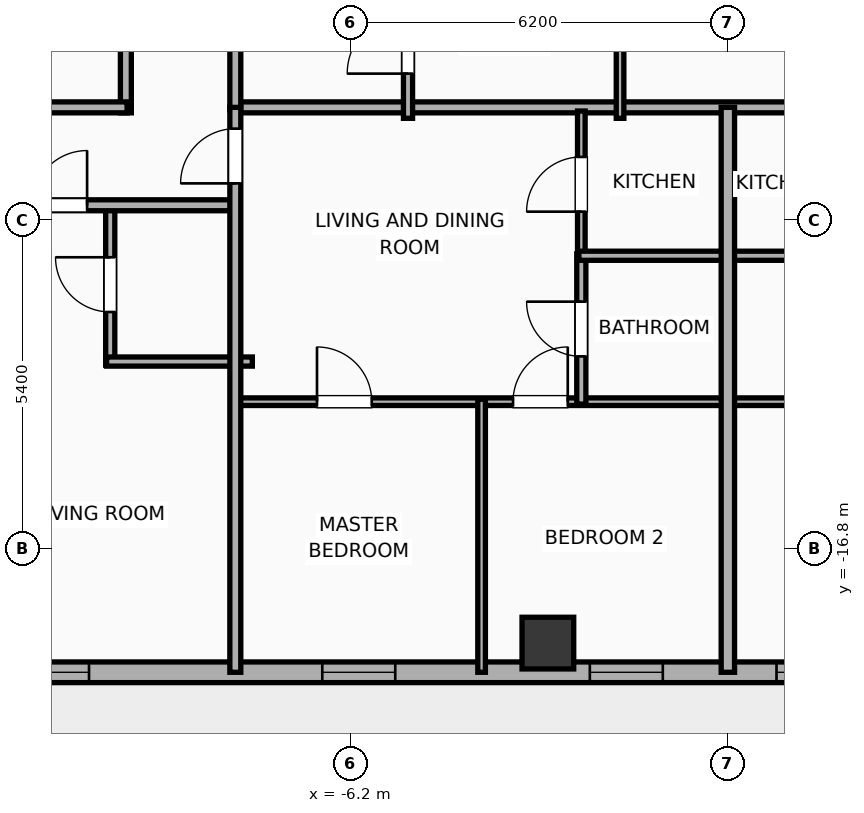
"""IFC4 building model, lengths in metres.
Left out: names, types, materials, properties, quantities, classifications, styles, units other than length and angle.
Written with IfcOpenShell. Run it as: python <this file> out.ifc"""

import sys

from ifc_helpers import new_model, si_unit, direction, frame, frame_2d, origin, origin_2d, place, context, subcontext, project, spatial, rectangle, hollow_rectangle, extrude, element, fill, save


model = new_model("IFC4")
c1 = context("Model", 3, precision=1e-05, world=origin(), true_north=direction((0.0, 1.0)))
c2 = subcontext(c1, "Body", "Model", "MODEL_VIEW")
j1 = project(units=[si_unit("LENGTHUNIT", "METRE"), si_unit("PLANEANGLEUNIT", "RADIAN")], contexts=[c1])
p1 = place(None, origin())
s1 = spatial("IfcSite", under=j1, at=p1, CompositionType="ELEMENT")
p2 = place(p1, origin())
s2 = spatial("IfcBuilding", under=s1, at=p2, CompositionType="ELEMENT")
p3 = place(p2, frame((0.0, 0.0, 231.4)))
s3 = spatial("IfcBuildingStorey", under=s2, at=p3, CompositionType="ELEMENT", Elevation=231.4)
p4 = place(p3, frame((-2.96, -18.35, 0.0), z_axis=(0.0, 0.0, 1.0), x_axis=(1.0, 0.0, 0.0)))
e1 = element("IfcColumn", 1, at=p4, inside=s3, PredefinedType="COLUMN", context=c2, shape_type="SweptSolid", body=[
    extrude(hollow_rectangle(XDim=0.85, YDim=0.85, WallThickness=0.028, at=origin_2d()), origin(), (0.0, 0.0, 1.0), 3.9),
])
p5 = place(p3, frame((26.783, -18.83, 0.0), z_axis=(0.0, 0.0, 1.0), x_axis=(-1.0, 0.0, 0.0)))
e2 = element("IfcWall", 2, at=p5, inside=s3, PredefinedType="ELEMENTEDWALL", context=c2, shape_type="SweptSolid", body=[
    extrude(rectangle(XDim=49.566, YDim=0.34, at=frame_2d((24.783, 0.0))), origin(), (0.0, 0.0, 1.0), 3.65),
])
p6 = place(p5, frame((23.583, 0.0, 0.75)))
e3 = element("IfcOpeningElement", 3, at=p6, cuts=e2, PredefinedType="OPENING", context=c2, shape_type="SweptSolid", body=[
    extrude(rectangle(XDim=2.4, YDim=2.1, at=frame_2d((1.2, 1.05))), frame((0.0, 0.18, 0.0), z_axis=(0.0, -1.0, 0.0), x_axis=(1.0, 0.0, 0.0)), (0.0, 0.0, 1.0), 0.36),
])
p7 = place(p5, frame((41.756, 0.0, 0.75)))
e4 = element("IfcOpeningElement", 4, at=p7, cuts=e2, PredefinedType="OPENING", context=c2, shape_type="SweptSolid", body=[
    extrude(rectangle(XDim=2.4, YDim=2.1, at=frame_2d((1.2, 1.05))), frame((0.0, 0.18, 0.0), z_axis=(0.0, -1.0, 0.0), x_axis=(1.0, 0.0, 0.0)), (0.0, 0.0, 1.0), 0.36),
])
p8 = place(p5, frame((47.222, 0.0, 0.75)))
e5 = element("IfcOpeningElement", 5, at=p8, cuts=e2, PredefinedType="OPENING", context=c2, shape_type="SweptSolid", body=[
    extrude(rectangle(XDim=1.2, YDim=2.05, at=frame_2d((0.6, 1.025))), frame((0.0, 0.18, 0.0), z_axis=(0.0, -1.0, 0.0), x_axis=(1.0, 0.0, 0.0)), (0.0, 0.0, 1.0), 0.36),
])
p9 = place(p5, frame((45.263, 0.0, 0.75)))
e6 = element("IfcOpeningElement", 6, at=p9, cuts=e2, PredefinedType="OPENING", context=c2, shape_type="SweptSolid", body=[
    extrude(rectangle(XDim=1.2, YDim=2.05, at=frame_2d((0.6, 1.025))), frame((0.0, 0.18, 0.0), z_axis=(0.0, -1.0, 0.0), x_axis=(1.0, 0.0, 0.0)), (0.0, 0.0, 1.0), 0.36),
])
p10 = place(p5, frame((37.289, 0.0, 0.75)))
e7 = element("IfcOpeningElement", 7, at=p10, cuts=e2, PredefinedType="OPENING", context=c2, shape_type="SweptSolid", body=[
    extrude(rectangle(XDim=1.2, YDim=2.05, at=frame_2d((0.6, 1.025))), frame((0.0, 0.18, 0.0), z_axis=(0.0, -1.0, 0.0), x_axis=(1.0, 0.0, 0.0)), (0.0, 0.0, 1.0), 0.36),
])
p11 = place(p5, frame((16.115, 0.0, 0.75)))
e8 = element("IfcOpeningElement", 8, at=p11, cuts=e2, PredefinedType="OPENING", context=c2, shape_type="SweptSolid", body=[
    extrude(rectangle(XDim=1.2, YDim=2.05, at=frame_2d((0.6, 1.025))), frame((0.0, 0.18, 0.0), z_axis=(0.0, -1.0, 0.0), x_axis=(1.0, 0.0, 0.0)), (0.0, 0.0, 1.0), 0.36),
])
p12 = place(p5, frame((12.422, 0.0, 0.75)))
e9 = element("IfcOpeningElement", 9, at=p12, cuts=e2, PredefinedType="OPENING", context=c2, shape_type="SweptSolid", body=[
    extrude(rectangle(XDim=1.2, YDim=2.05, at=frame_2d((0.6, 1.025))), frame((0.0, 0.18, 0.0), z_axis=(0.0, -1.0, 0.0), x_axis=(1.0, 0.0, 0.0)), (0.0, 0.0, 1.0), 0.36),
])
p13 = place(p5, frame((8.01, 0.0, 0.75)))
e10 = element("IfcOpeningElement", 10, at=p13, cuts=e2, PredefinedType="OPENING", context=c2, shape_type="SweptSolid", body=[
    extrude(rectangle(XDim=1.2, YDim=2.05, at=frame_2d((0.6, 1.025))), frame((0.0, 0.18, 0.0), z_axis=(0.0, -1.0, 0.0), x_axis=(1.0, 0.0, 0.0)), (0.0, 0.0, 1.0), 0.36),
])
p14 = place(p5, frame((5.037, 0.0, 0.75)))
e11 = element("IfcOpeningElement", 11, at=p14, cuts=e2, PredefinedType="OPENING", context=c2, shape_type="SweptSolid", body=[
    extrude(rectangle(XDim=1.2, YDim=2.05, at=frame_2d((0.6, 1.025))), frame((0.0, 0.18, 0.0), z_axis=(0.0, -1.0, 0.0), x_axis=(1.0, 0.0, 0.0)), (0.0, 0.0, 1.0), 0.36),
])
p15 = place(p5, frame((1.811, 0.0, 0.75)))
e12 = element("IfcOpeningElement", 12, at=p15, cuts=e2, PredefinedType="OPENING", context=c2, shape_type="SweptSolid", body=[
    extrude(rectangle(XDim=1.2, YDim=2.05, at=frame_2d((0.6, 1.025))), frame((0.0, 0.18, 0.0), z_axis=(0.0, -1.0, 0.0), x_axis=(1.0, 0.0, 0.0)), (0.0, 0.0, 1.0), 0.36),
])
p16 = place(p5, frame((32.253, 0.0, 0.75)))
e13 = element("IfcOpeningElement", 13, at=p16, cuts=e2, PredefinedType="OPENING", context=c2, shape_type="SweptSolid", body=[
    extrude(rectangle(XDim=1.2, YDim=2.05, at=frame_2d((0.6, 1.025))), frame((0.0, 0.18, 0.0), z_axis=(0.0, -1.0, 0.0), x_axis=(1.0, 0.0, 0.0)), (0.0, 0.0, 1.0), 0.36),
])
p17 = place(p5, frame((27.853, 0.0, 0.75)))
e14 = element("IfcOpeningElement", 14, at=p17, cuts=e2, PredefinedType="OPENING", context=c2, shape_type="SweptSolid", body=[
    extrude(rectangle(XDim=1.2, YDim=2.05, at=frame_2d((0.6, 1.025))), frame((0.0, 0.18, 0.0), z_axis=(0.0, -1.0, 0.0), x_axis=(1.0, 0.0, 0.0)), (0.0, 0.0, 1.0), 0.36),
])
p18 = place(p5, frame((20.473, 0.0, 0.75)))
e15 = element("IfcOpeningElement", 15, at=p18, cuts=e2, PredefinedType="OPENING", context=c2, shape_type="SweptSolid", body=[
    extrude(rectangle(XDim=1.2, YDim=2.05, at=frame_2d((0.6, 1.025))), frame((0.0, 0.18, 0.0), z_axis=(0.0, -1.0, 0.0), x_axis=(1.0, 0.0, 0.0)), (0.0, 0.0, 1.0), 0.36),
])
p19 = place(p3, frame((-9.9, -9.63, 0.0), z_axis=(0.0, 0.0, 1.0), x_axis=(0.0, 1.0, 0.0)))
e16 = element("IfcWall", 16, at=p19, inside=s3, PredefinedType="PARTITIONING", context=c2, shape_type="SweptSolid", body=[
    extrude(rectangle(XDim=19.26, YDim=0.18, at=frame_2d((9.63, 0.0))), origin(), (0.0, 0.0, 1.0), 3.65),
])
p20 = place(p19, frame((8.117, 0.0, 0.0)))
e17 = element("IfcOpeningElement", 17, at=p20, cuts=e16, PredefinedType="OPENING", context=c2, shape_type="SweptSolid", body=[
    extrude(rectangle(XDim=1.1, YDim=2.05, at=frame_2d((0.55, 1.025))), frame((0.0, 0.1, 0.0), z_axis=(0.0, -1.0, 0.0), x_axis=(1.0, 0.0, 0.0)), (0.0, 0.0, 1.0), 0.2),
])
p21 = place(p3, frame((-26.23, -9.54, 0.0), z_axis=(0.0, 0.0, 1.0), x_axis=(1.0, 0.0, 0.0)))
e18 = element("IfcWall", 18, at=p21, inside=s3, PredefinedType="PARTITIONING", context=c2, shape_type="SweptSolid", body=[
    extrude(rectangle(XDim=16.35, YDim=0.18, at=frame_2d((8.175, 0.0))), origin(), (0.0, 0.0, 1.0), 3.65),
])
p22 = place(p3, frame((-8.15, -9.54, 0.0), z_axis=(0.0, 0.0, 1.0), x_axis=(1.0, 0.0, 0.0)))
e19 = element("IfcWall", 19, at=p22, inside=s3, PredefinedType="PARTITIONING", context=c2, shape_type="SweptSolid", body=[
    extrude(rectangle(XDim=16.3, YDim=0.18, at=frame_2d((8.15, 0.0))), origin(), (0.0, 0.0, 1.0), 3.65),
])
p23 = place(p3, frame((-8.1, -9.58, 0.0), z_axis=(0.0, 0.0, 1.0), x_axis=(0.0, 1.0, 0.0)))
e20 = element("IfcWall", 20, at=p23, inside=s3, PredefinedType="PARTITIONING", context=c2, shape_type="SweptSolid", body=[
    extrude(rectangle(XDim=19.16, YDim=0.18, at=frame_2d((9.58, 0.0))), origin(), (0.0, 0.0, 1.0), 3.65),
])
p24 = place(p23, frame((1.416, 0.0, 0.0)))
e21 = element("IfcOpeningElement", 21, at=p24, cuts=e20, PredefinedType="OPENING", context=c2, shape_type="SweptSolid", body=[
    extrude(rectangle(XDim=1.0, YDim=2.05, at=frame_2d((0.5, 1.025))), frame((0.0, 0.1, 0.0), z_axis=(0.0, -1.0, 0.0), x_axis=(1.0, 0.0, 0.0)), (0.0, 0.0, 1.0), 0.2),
])
p25 = place(p23, frame((11.021, 0.0, 0.0)))
e22 = element("IfcOpeningElement", 22, at=p25, cuts=e20, PredefinedType="OPENING", context=c2, shape_type="SweptSolid", body=[
    extrude(rectangle(XDim=0.95, YDim=2.05, at=frame_2d((0.475, 1.025))), frame((0.0, 0.1, 0.0), z_axis=(0.0, -1.0, 0.0), x_axis=(1.0, 0.0, 0.0)), (0.0, 0.0, 1.0), 0.2),
])
p26 = place(p3, frame((-5.26, -9.72, 0.0), z_axis=(0.0, 0.0, 1.0), x_axis=(0.0, 1.0, 0.0)))
e23 = element("IfcWall", 23, at=p26, inside=s3, PredefinedType="PLUMBINGWALL", context=c2, shape_type="SweptSolid", body=[
    extrude(rectangle(XDim=3.35, YDim=0.15, at=frame_2d((1.675, 0.0))), origin(), (0.0, 0.0, 1.0), 3.65),
])
p27 = place(p26, frame((0.735, 0.0, 0.0)))
e24 = element("IfcOpeningElement", 24, at=p27, cuts=e23, PredefinedType="OPENING", context=c2, shape_type="SweptSolid", body=[
    extrude(rectangle(XDim=1.0, YDim=2.05, at=frame_2d((0.5, 1.025))), frame((0.0, 0.085, 0.0), z_axis=(0.0, -1.0, 0.0), x_axis=(1.0, 0.0, 0.0)), (0.0, 0.0, 1.0), 0.17),
])
p28 = place(p3, frame((-1.773, -9.72, 0.0), z_axis=(0.0, 0.0, 1.0), x_axis=(0.0, 1.0, 0.0)))
e25 = element("IfcWall", 25, at=p28, inside=s3, PredefinedType="PARTITIONING", context=c2, shape_type="SweptSolid", body=[
    extrude(rectangle(XDim=19.39, YDim=0.125, at=frame_2d((9.695, 0.0))), origin(), (0.0, 0.0, 1.0), 3.65),
])
p29 = place(p28, frame((9.22, 0.0, 0.0)))
e26 = element("IfcOpeningElement", 26, at=p29, cuts=e25, PredefinedType="OPENING", context=c2, shape_type="SweptSolid", body=[
    extrude(rectangle(XDim=0.95, YDim=2.05, at=frame_2d((0.475, 1.025))), frame((0.0, 0.073, 0.0), z_axis=(0.0, -1.0, 0.0), x_axis=(1.0, 0.0, 0.0)), (0.0, 0.0, 1.0), 0.145),
])
p30 = place(p3, frame((-10.157, -13.78, 0.0), z_axis=(0.0, 0.0, 1.0), x_axis=(0.0, 1.0, 0.0)))
e27 = element("IfcWall", 27, at=p30, inside=s3, PredefinedType="PLUMBINGWALL", context=c2, shape_type="SweptSolid", body=[
    extrude(rectangle(XDim=2.65, YDim=0.15, at=frame_2d((1.325, 0.0))), origin(), (0.0, 0.0, 1.0), 3.65),
])
p31 = place(p30, frame((0.875, 0.0, 0.0)))
e28 = element("IfcOpeningElement", 28, at=p31, cuts=e27, PredefinedType="OPENING", context=c2, shape_type="SweptSolid", body=[
    extrude(rectangle(XDim=0.9, YDim=2.05, at=frame_2d((0.45, 1.025))), frame((0.0, 0.085, 0.0), z_axis=(0.0, -1.0, 0.0), x_axis=(1.0, 0.0, 0.0)), (0.0, 0.0, 1.0), 0.17),
])
p32 = place(p3, frame((-10.217, -13.72, 0.0), z_axis=(0.0, 0.0, 1.0), x_axis=(1.0, 0.0, 0.0)))
e29 = element("IfcWall", 29, at=p32, inside=s3, PredefinedType="PLUMBINGWALL", context=c2, shape_type="SweptSolid", body=[
    extrude(rectangle(XDim=2.397, YDim=0.15, at=frame_2d((1.198, 0.0))), origin(), (0.0, 0.0, 1.0), 3.65),
])
p33 = place(p3, frame((-26.23, -11.15, 0.0), z_axis=(0.0, 0.0, 1.0), x_axis=(1.0, 0.0, 0.0)))
e30 = element("IfcWall", 30, at=p33, inside=s3, PredefinedType="PARTITIONING", context=c2, shape_type="SweptSolid", body=[
    extrude(rectangle(XDim=18.15, YDim=0.18, at=frame_2d((9.075, 0.0))), origin(), (0.0, 0.0, 1.0), 3.65),
])
p34 = place(p33, frame((2.659, 0.0, 0.0)))
e31 = element("IfcOpeningElement", 31, at=p34, cuts=e30, PredefinedType="OPENING", context=c2, shape_type="SweptSolid", body=[
    extrude(rectangle(XDim=0.9, YDim=2.05, at=frame_2d((0.45, 1.025))), frame((0.0, 0.1, 0.0), z_axis=(0.0, -1.0, 0.0), x_axis=(1.0, 0.0, 0.0)), (0.0, 0.0, 1.0), 0.2),
])
p35 = place(p33, frame((9.571, 0.0, 0.0)))
e32 = element("IfcOpeningElement", 32, at=p35, cuts=e30, PredefinedType="OPENING", context=c2, shape_type="SweptSolid", body=[
    extrude(rectangle(XDim=1.15, YDim=2.05, at=frame_2d((0.575, 1.025))), frame((0.0, 0.1, 0.0), z_axis=(0.0, -1.0, 0.0), x_axis=(1.0, 0.0, 0.0)), (0.0, 0.0, 1.0), 0.2),
])
p36 = place(p33, frame((14.792, 0.0, 0.0)))
e33 = element("IfcOpeningElement", 33, at=p36, cuts=e30, PredefinedType="OPENING", context=c2, shape_type="SweptSolid", body=[
    extrude(rectangle(XDim=0.9, YDim=2.05, at=frame_2d((0.45, 1.025))), frame((0.0, 0.1, 0.0), z_axis=(0.0, -1.0, 0.0), x_axis=(1.0, 0.0, 0.0)), (0.0, 0.0, 1.0), 0.2),
])
p37 = place(p3, frame((-8.08, -14.38, 0.0), z_axis=(0.0, 0.0, 1.0), x_axis=(1.0, 0.0, 0.0)))
e34 = element("IfcWall", 34, at=p37, inside=s3, PredefinedType="PARTITIONING", context=c2, shape_type="SweptSolid", body=[
    extrude(rectangle(XDim=8.06, YDim=0.125, at=frame_2d((4.03, 0.0))), origin(), (0.0, 0.0, 1.0), 3.65),
])
p38 = place(p37, frame((1.323, 0.0, 0.0)))
e35 = element("IfcOpeningElement", 35, at=p38, cuts=e34, PredefinedType="OPENING", context=c2, shape_type="SweptSolid", body=[
    extrude(rectangle(XDim=0.9, YDim=2.05, at=frame_2d((0.45, 1.025))), frame((0.0, 0.073, 0.0), z_axis=(0.0, -1.0, 0.0), x_axis=(1.0, 0.0, 0.0)), (0.0, 0.0, 1.0), 0.145),
])
p39 = place(p37, frame((4.547, 0.0, 0.0)))
e36 = element("IfcOpeningElement", 36, at=p39, cuts=e34, PredefinedType="OPENING", context=c2, shape_type="SweptSolid", body=[
    extrude(rectangle(XDim=0.9, YDim=2.05, at=frame_2d((0.45, 1.025))), frame((0.0, 0.073, 0.0), z_axis=(0.0, -1.0, 0.0), x_axis=(1.0, 0.0, 0.0)), (0.0, 0.0, 1.0), 0.145),
])
p40 = place(p3, frame((-2.41, -12.01, 0.0), z_axis=(0.0, 0.0, 1.0), x_axis=(0.0, 1.0, 0.0)))
e37 = element("IfcWall", 37, at=p40, inside=s3, PredefinedType="PARTITIONING", context=c2, shape_type="SweptSolid", body=[
    extrude(rectangle(XDim=2.41, YDim=0.125, at=frame_2d((1.205, 0.0))), origin(), (0.0, 0.0, 1.0), 3.65),
])
p41 = place(p40, frame((0.755, 0.0, 0.0)))
e38 = element("IfcOpeningElement", 38, at=p41, cuts=e37, PredefinedType="OPENING", context=c2, shape_type="SweptSolid", body=[
    extrude(rectangle(XDim=0.9, YDim=2.05, at=frame_2d((0.45, 1.025))), frame((0.0, 0.073, 0.0), z_axis=(0.0, -1.0, 0.0), x_axis=(1.0, 0.0, 0.0)), (0.0, 0.0, 1.0), 0.145),
])
p42 = place(p3, frame((-2.41, -14.42, 0.0), z_axis=(0.0, 0.0, 1.0), x_axis=(0.0, 1.0, 0.0)))
e39 = element("IfcWall", 39, at=p42, inside=s3, PredefinedType="PLUMBINGWALL", context=c2, shape_type="SweptSolid", body=[
    extrude(rectangle(XDim=2.47, YDim=0.15, at=frame_2d((1.235, 0.0))), origin(), (0.0, 0.0, 1.0), 3.65),
])
p43 = place(p42, frame((0.785, 0.0, 0.0)))
e40 = element("IfcOpeningElement", 40, at=p43, cuts=e39, PredefinedType="OPENING", context=c2, shape_type="SweptSolid", body=[
    extrude(rectangle(XDim=0.9, YDim=2.05, at=frame_2d((0.45, 1.025))), frame((0.0, 0.085, 0.0), z_axis=(0.0, -1.0, 0.0), x_axis=(1.0, 0.0, 0.0)), (0.0, 0.0, 1.0), 0.17),
])
p44 = place(p3, frame((-2.45, -11.98, 0.0), z_axis=(0.0, 0.0, 1.0), x_axis=(1.0, 0.0, 0.0)))
e41 = element("IfcWall", 41, at=p44, inside=s3, PredefinedType="PLUMBINGWALL", context=c2, shape_type="SweptSolid", body=[
    extrude(rectangle(XDim=2.43, YDim=0.15, at=frame_2d((1.215, 0.0))), origin(), (0.0, 0.0, 1.0), 3.65),
])
p45 = place(p3, frame((-4.05, -18.83, 0.0), z_axis=(0.0, 0.0, 1.0), x_axis=(0.0, 1.0, 0.0)))
e42 = element("IfcWall", 42, at=p45, inside=s3, PredefinedType="PARTITIONING", context=c2, shape_type="SweptSolid", body=[
    extrude(rectangle(XDim=4.49, YDim=0.125, at=frame_2d((2.245, 0.0))), origin(), (0.0, 0.0, 1.0), 3.65),
])
p46 = place(p3, frame((-8.1, -18.83, 0.0), z_axis=(0.0, 0.0, 1.0), x_axis=(0.0, 1.0, 0.0)))
e43 = element("IfcWall", 43, at=p46, inside=s3, PredefinedType="PARTITIONING", context=c2, shape_type="SweptSolid", body=[
    extrude(rectangle(XDim=9.29, YDim=0.18, at=frame_2d((4.645, 0.0))), origin(), (0.0, 0.0, 1.0), 3.65),
])
p47 = place(p46, frame((8.04, 0.0, 0.0)))
e44 = element("IfcOpeningElement", 44, at=p47, cuts=e43, PredefinedType="OPENING", context=c2, shape_type="SweptSolid", body=[
    extrude(rectangle(XDim=0.9, YDim=2.05, at=frame_2d((0.45, 1.025))), frame((0.0, 0.1, 0.0), z_axis=(0.0, -1.0, 0.0), x_axis=(1.0, 0.0, 0.0)), (0.0, 0.0, 1.0), 0.2),
])
p48 = place(p3, frame((0.02, -14.38, 0.0), z_axis=(0.0, 0.0, 1.0), x_axis=(1.0, 0.0, 0.0)))
e45 = element("IfcWall", 45, at=p48, inside=s3, PredefinedType="PARTITIONING", context=c2, shape_type="SweptSolid", body=[
    extrude(rectangle(XDim=8.06, YDim=0.125, at=frame_2d((4.03, 0.0))), origin(), (0.0, 0.0, 1.0), 3.65),
])
p49 = place(p48, frame((1.323, 0.0, 0.0)))
e46 = element("IfcOpeningElement", 46, at=p49, cuts=e45, PredefinedType="OPENING", context=c2, shape_type="SweptSolid", body=[
    extrude(rectangle(XDim=0.9, YDim=2.05, at=frame_2d((0.45, 1.025))), frame((0.0, 0.073, 0.0), z_axis=(0.0, -1.0, 0.0), x_axis=(1.0, 0.0, 0.0)), (0.0, 0.0, 1.0), 0.145),
])
p50 = place(p48, frame((5.837, 0.0, 0.0)))
e47 = element("IfcOpeningElement", 47, at=p50, cuts=e45, PredefinedType="OPENING", context=c2, shape_type="SweptSolid", body=[
    extrude(rectangle(XDim=0.9, YDim=2.05, at=frame_2d((0.45, 1.025))), frame((0.0, 0.073, 0.0), z_axis=(0.0, -1.0, 0.0), x_axis=(1.0, 0.0, 0.0)), (0.0, 0.0, 1.0), 0.145),
])
p51 = place(p3, frame((0.02, -11.98, 0.0), z_axis=(0.0, 0.0, 1.0), x_axis=(1.0, 0.0, 0.0)))
e48 = element("IfcWall", 48, at=p51, inside=s3, PredefinedType="PLUMBINGWALL", context=c2, shape_type="SweptSolid", body=[
    extrude(rectangle(XDim=2.43, YDim=0.15, at=frame_2d((1.215, 0.0))), origin(), (0.0, 0.0, 1.0), 3.65),
])
p52 = place(p3, frame((0.0, -18.83, 0.0), z_axis=(0.0, 0.0, 1.0), x_axis=(0.0, 1.0, 0.0)))
e49 = element("IfcWall", 49, at=p52, inside=s3, PredefinedType="PARTITIONING", context=c2, shape_type="SweptSolid", body=[
    extrude(rectangle(XDim=9.29, YDim=0.22, at=frame_2d((4.645, 0.0))), origin(), (0.0, 0.0, 1.0), 3.65),
])
p53 = place(p6, origin())
e50 = element("IfcWindow", 50, at=p53, inside=s3, PartitioningType="SINGLE_PANEL", PredefinedType="WINDOW", context=c2, shape_type="SweptSolid", body=[
    extrude(rectangle(XDim=2.4, YDim=2.1, at=frame_2d((1.2, 1.05))), frame((0.0, 0.03, 0.0), z_axis=(0.0, -1.0, 0.0), x_axis=(1.0, 0.0, 0.0)), (0.0, 0.0, 1.0), 0.06),
])
fill(e3, e50)
p54 = place(p10, origin())
e51 = element("IfcWindow", 51, at=p54, inside=s3, PartitioningType="SINGLE_PANEL", PredefinedType="WINDOW", context=c2, shape_type="SweptSolid", body=[
    extrude(rectangle(XDim=1.2, YDim=2.05, at=frame_2d((0.6, 1.025))), frame((0.0, 0.03, 0.0), z_axis=(0.0, -1.0, 0.0), x_axis=(1.0, 0.0, 0.0)), (0.0, 0.0, 1.0), 0.06),
])
fill(e7, e51)
p55 = place(p16, origin())
e52 = element("IfcWindow", 52, at=p55, inside=s3, PartitioningType="SINGLE_PANEL", PredefinedType="WINDOW", context=c2, shape_type="SweptSolid", body=[
    extrude(rectangle(XDim=1.2, YDim=2.05, at=frame_2d((0.6, 1.025))), frame((0.0, 0.03, 0.0), z_axis=(0.0, -1.0, 0.0), x_axis=(1.0, 0.0, 0.0)), (0.0, 0.0, 1.0), 0.06),
])
fill(e13, e52)
p56 = place(p17, origin())
e53 = element("IfcWindow", 53, at=p56, inside=s3, PartitioningType="SINGLE_PANEL", PredefinedType="WINDOW", context=c2, shape_type="SweptSolid", body=[
    extrude(rectangle(XDim=1.2, YDim=2.05, at=frame_2d((0.6, 1.025))), frame((0.0, 0.03, 0.0), z_axis=(0.0, -1.0, 0.0), x_axis=(1.0, 0.0, 0.0)), (0.0, 0.0, 1.0), 0.06),
])
fill(e14, e53)
p57 = place(p27, origin())
e54 = element("IfcDoor", 54, at=p57, inside=s3, OperationType="SINGLE_SWING_LEFT", PredefinedType="DOOR", context=c2, shape_type="SweptSolid", body=[
    extrude(rectangle(XDim=1.0, YDim=2.05, at=frame_2d((0.5, 1.025))), frame((0.0, 0.025, 0.0), z_axis=(0.0, -1.0, 0.0), x_axis=(1.0, 0.0, 0.0)), (0.0, 0.0, 1.0), 0.05),
])
fill(e24, e54)
p58 = place(p31, origin())
e55 = element("IfcDoor", 55, at=p58, inside=s3, OperationType="SINGLE_SWING_RIGHT", PredefinedType="DOOR", context=c2, shape_type="SweptSolid", body=[
    extrude(rectangle(XDim=0.9, YDim=2.05, at=frame_2d((0.45, 1.025))), frame((0.0, 0.025, 0.0), z_axis=(0.0, -1.0, 0.0), x_axis=(1.0, 0.0, 0.0)), (0.0, 0.0, 1.0), 0.05),
])
fill(e28, e55)
p59 = place(p36, origin())
e56 = element("IfcDoor", 56, at=p59, inside=s3, OperationType="SINGLE_SWING_RIGHT", PredefinedType="DOOR", context=c2, shape_type="SweptSolid", body=[
    extrude(rectangle(XDim=0.9, YDim=2.05, at=frame_2d((0.45, 1.025))), frame((0.0, 0.025, 0.0), z_axis=(0.0, -1.0, 0.0), x_axis=(1.0, 0.0, 0.0)), (0.0, 0.0, 1.0), 0.05),
])
fill(e33, e56)
p60 = place(p38, origin())
e57 = element("IfcDoor", 57, at=p60, inside=s3, OperationType="SINGLE_SWING_LEFT", PredefinedType="DOOR", context=c2, shape_type="SweptSolid", body=[
    extrude(rectangle(XDim=0.9, YDim=2.05, at=frame_2d((0.45, 1.025))), frame((0.0, 0.025, 0.0), z_axis=(0.0, -1.0, 0.0), x_axis=(1.0, 0.0, 0.0)), (0.0, 0.0, 1.0), 0.05),
])
fill(e35, e57)
p61 = place(p39, origin())
e58 = element("IfcDoor", 58, at=p61, inside=s3, OperationType="SINGLE_SWING_RIGHT", PredefinedType="DOOR", context=c2, shape_type="SweptSolid", body=[
    extrude(rectangle(XDim=0.9, YDim=2.05, at=frame_2d((0.45, 1.025))), frame((0.0, 0.025, 0.0), z_axis=(0.0, -1.0, 0.0), x_axis=(1.0, 0.0, 0.0)), (0.0, 0.0, 1.0), 0.05),
])
fill(e36, e58)
p62 = place(p41, origin())
e59 = element("IfcDoor", 59, at=p62, inside=s3, OperationType="SINGLE_SWING_LEFT", PredefinedType="DOOR", context=c2, shape_type="SweptSolid", body=[
    extrude(rectangle(XDim=0.9, YDim=2.05, at=frame_2d((0.45, 1.025))), frame((0.0, 0.025, 0.0), z_axis=(0.0, -1.0, 0.0), x_axis=(1.0, 0.0, 0.0)), (0.0, 0.0, 1.0), 0.05),
])
fill(e38, e59)
p63 = place(p43, origin())
e60 = element("IfcDoor", 60, at=p63, inside=s3, OperationType="SINGLE_SWING_RIGHT", PredefinedType="DOOR", context=c2, shape_type="SweptSolid", body=[
    extrude(rectangle(XDim=0.9, YDim=2.05, at=frame_2d((0.45, 1.025))), frame((0.0, 0.025, 0.0), z_axis=(0.0, -1.0, 0.0), x_axis=(1.0, 0.0, 0.0)), (0.0, 0.0, 1.0), 0.05),
])
fill(e40, e60)
p64 = place(p47, origin())
e61 = element("IfcDoor", 61, at=p64, inside=s3, OperationType="SINGLE_SWING_LEFT", PredefinedType="DOOR", context=c2, shape_type="SweptSolid", body=[
    extrude(rectangle(XDim=0.9, YDim=2.05, at=frame_2d((0.45, 1.025))), frame((0.0, 0.025, 0.0), z_axis=(0.0, -1.0, 0.0), x_axis=(1.0, 0.0, 0.0)), (0.0, 0.0, 1.0), 0.05),
])
fill(e44, e61)
save(model, sys.argv[1])
